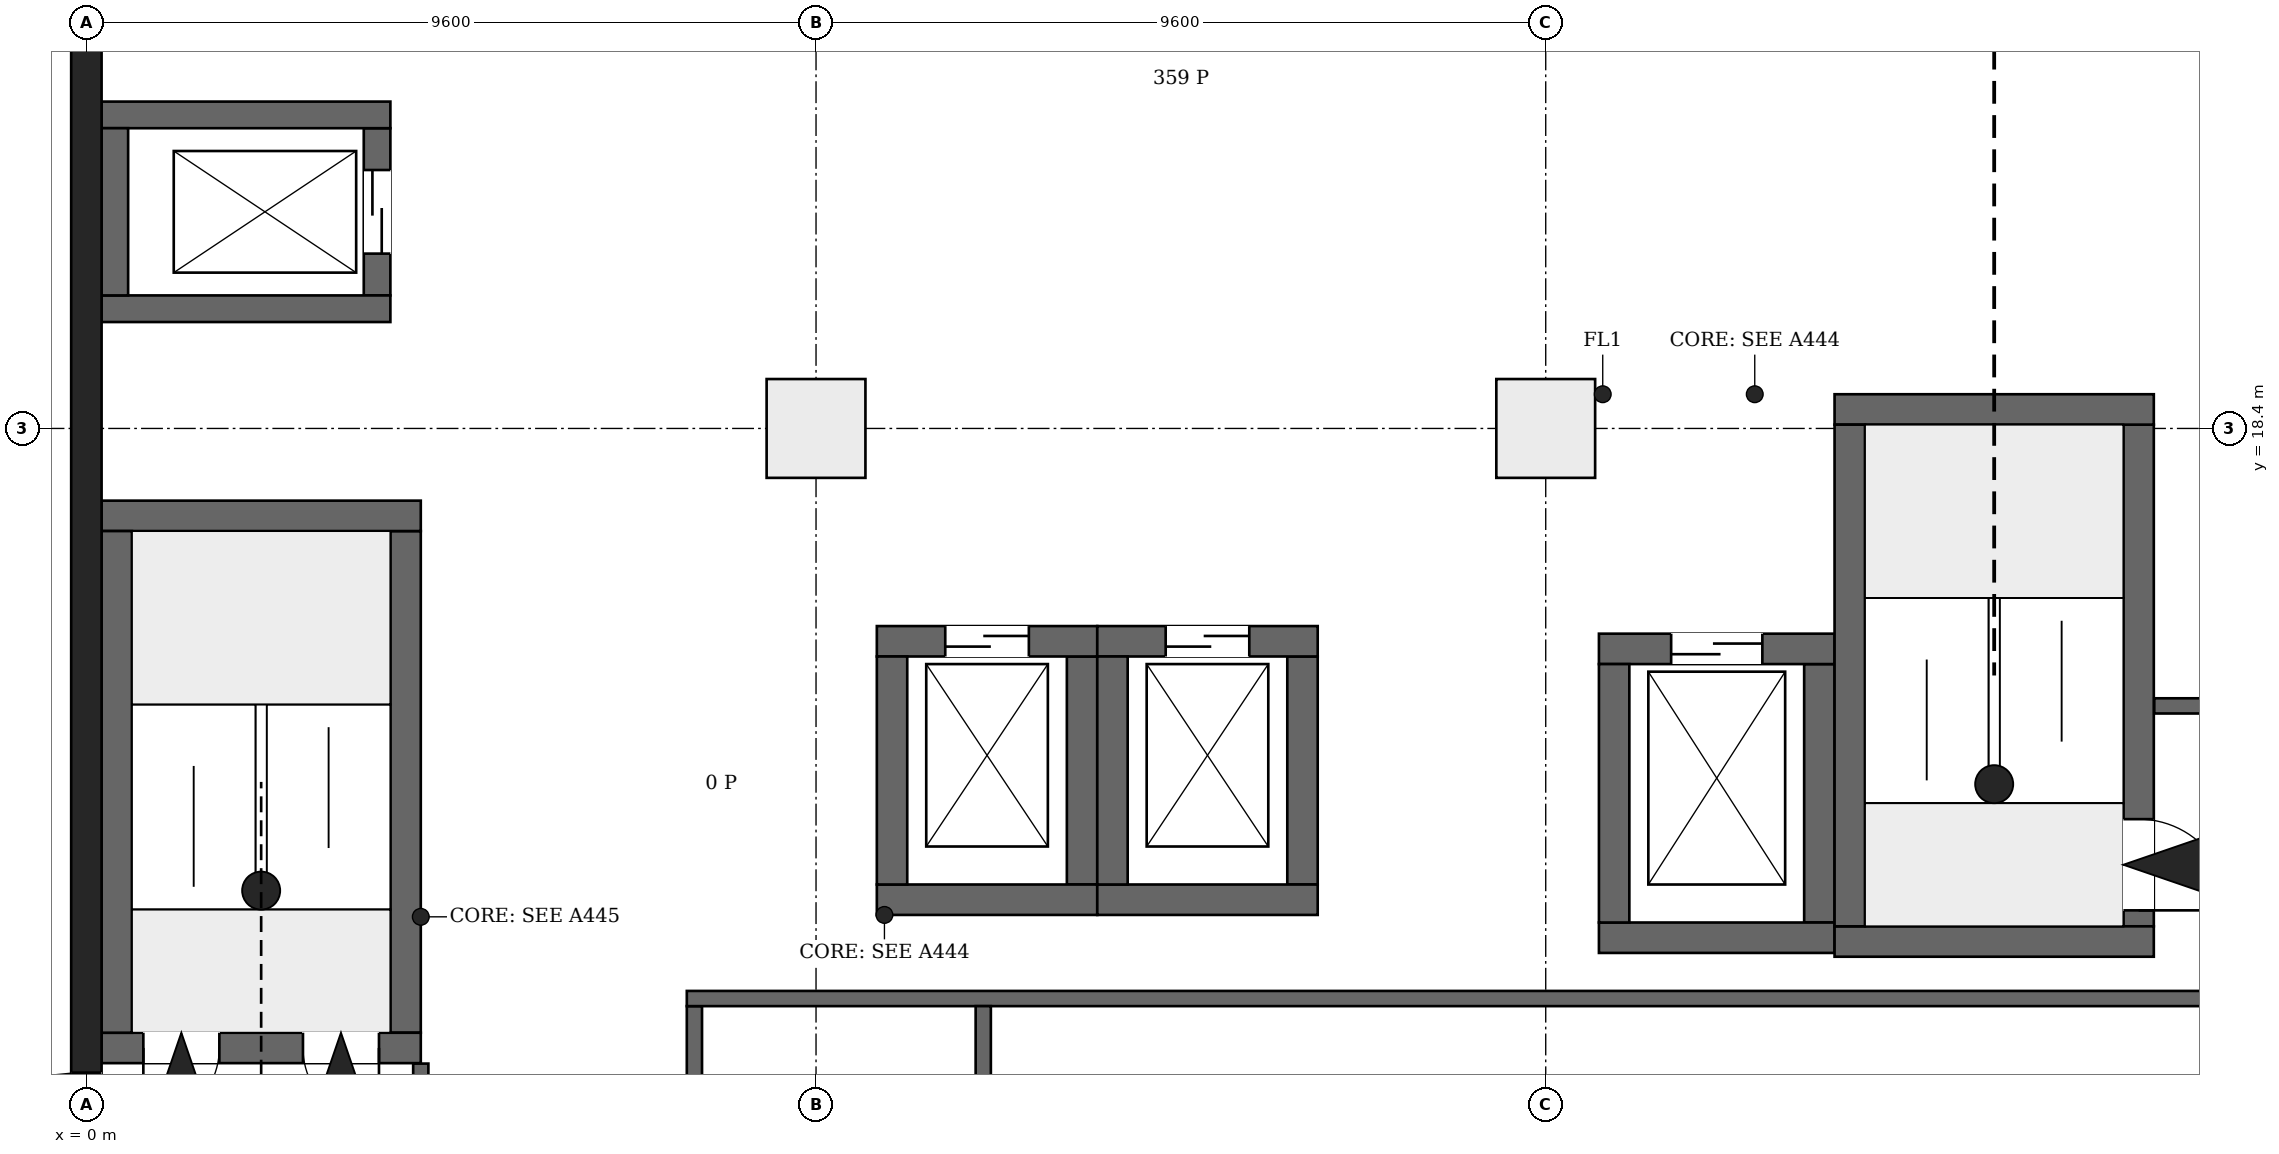
"""IFC4 building model, lengths in metres.
Left out: names, types, materials, properties, quantities, classifications, styles, units other than length and angle.
Written with IfcOpenShell. Run it as: python <this file> out.ifc"""

import sys

from ifc_helpers import new_model, si_unit, direction, frame, frame_2d, origin, origin_2d, place, context, subcontext, project, spatial, rectangle, extrude, element, fill, save


model = new_model("IFC4")
c1 = context("Model", 3, precision=1e-05, world=origin(), true_north=direction((0.0, 1.0)))
c2 = subcontext(c1, "Body", "Model", "MODEL_VIEW")
j1 = project(units=[si_unit("LENGTHUNIT", "METRE"), si_unit("PLANEANGLEUNIT", "RADIAN")], contexts=[c1])
p1 = place(None, origin())
s1 = spatial("IfcSite", under=j1, at=p1, CompositionType="ELEMENT")
p2 = place(p1, origin())
s2 = spatial("IfcBuilding", under=s1, at=p2, CompositionType="ELEMENT")
p3 = place(p2, origin())
s3 = spatial("IfcBuildingStorey", under=s2, at=p3, CompositionType="ELEMENT", Elevation=0.0)
p4 = place(p3, frame((0.0, -0.2, 0.0), z_axis=(0.0, 0.0, 1.0), x_axis=(0.0, 1.0, 0.0)))
e1 = element("IfcWall", 1, at=p4, inside=s3, PredefinedType="SHEAR", context=c2, shape_type="SweptSolid", body=[
    extrude(rectangle(XDim=46.88, YDim=0.4, at=frame_2d((23.44, 0.0))), origin(), (0.0, 0.0, 1.0), 6.5),
])
p5 = place(p4, frame((7.125, 0.0, 0.0)))
e2 = element("IfcOpeningElement", 2, at=p5, cuts=e1, PredefinedType="OPENING", context=c2, shape_type="SweptSolid", body=[
    extrude(rectangle(XDim=3.0, YDim=2.4, at=frame_2d((1.5, 1.2))), frame((0.0, 0.21, 0.0), z_axis=(0.0, -1.0, 0.0), x_axis=(1.0, 0.0, 0.0)), (0.0, 0.0, 1.0), 0.42),
])
p6 = place(p4, frame((38.2, 0.0, 0.0)))
e3 = element("IfcOpeningElement", 3, at=p6, cuts=e1, PredefinedType="OPENING", context=c2, shape_type="SweptSolid", body=[
    extrude(rectangle(XDim=3.0, YDim=2.4, at=frame_2d((1.5, 1.2))), frame((0.0, 0.21, 0.0), z_axis=(0.0, -1.0, 0.0), x_axis=(1.0, 0.0, 0.0)), (0.0, 0.0, 1.0), 0.42),
])
p7 = place(p3, frame((0.2, 10.25, 0.0), z_axis=(0.0, 0.0, 1.0), x_axis=(1.0, 0.0, 0.0)))
e4 = element("IfcWall", 4, at=p7, inside=s3, PredefinedType="SHEAR", context=c2, shape_type="SweptSolid", body=[
    extrude(rectangle(XDim=4.2, YDim=0.4, at=frame_2d((2.1, 0.0))), origin(), (0.0, 0.0, 1.0), 6.5),
])
p8 = place(p7, frame((0.55, 0.0, 0.0)))
e5 = element("IfcOpeningElement", 5, at=p8, cuts=e4, PredefinedType="OPENING", context=c2, shape_type="SweptSolid", body=[
    extrude(rectangle(XDim=1.0, YDim=2.1, at=frame_2d((0.5, 1.05))), frame((0.0, 0.21, 0.0), z_axis=(0.0, -1.0, 0.0), x_axis=(1.0, 0.0, 0.0)), (0.0, 0.0, 1.0), 0.42),
])
p9 = place(p7, frame((2.65, 0.0, 0.0)))
e6 = element("IfcOpeningElement", 6, at=p9, cuts=e4, PredefinedType="OPENING", context=c2, shape_type="SweptSolid", body=[
    extrude(rectangle(XDim=1.0, YDim=2.1, at=frame_2d((0.5, 1.05))), frame((0.0, 0.21, 0.0), z_axis=(0.0, -1.0, 0.0), x_axis=(1.0, 0.0, 0.0)), (0.0, 0.0, 1.0), 0.42),
])
p10 = place(p3, frame((0.2, 17.25, 0.0), z_axis=(0.0, 0.0, 1.0), x_axis=(1.0, 0.0, 0.0)))
e7 = element("IfcWall", 7, at=p10, inside=s3, PredefinedType="SHEAR", context=c2, shape_type="SweptSolid", body=[
    extrude(rectangle(XDim=4.2, YDim=0.4, at=frame_2d((2.1, 0.0))), origin(), (0.0, 0.0, 1.0), 6.5),
])
for number, where, z_axis, x_axis in (
    (8, (0.4, 10.45, 0.0), (0.0, 0.0, 1.0), (0.0, 1.0, 0.0)),
    (9, (4.2, 10.45, 0.0), (0.0, 0.0, 1.0), (0.0, 1.0, 0.0)),
):
    element("IfcWall", number, at=place(p3, frame(where, z_axis=z_axis, x_axis=x_axis)), inside=s3, PredefinedType="SHEAR", context=c2, shape_type="SweptSolid", body=[
        extrude(rectangle(XDim=6.6, YDim=0.4, at=frame_2d((3.3, 0.0))), origin(), (0.0, 0.0, 1.0), 6.5),
    ])
for number, where, z_axis, x_axis in (
    (10, (23.0, 11.65, 0.0), (0.0, 0.0, 1.0), (1.0, 0.0, 0.0)),
    (11, (23.0, 18.65, 0.0), (0.0, 0.0, 1.0), (1.0, 0.0, 0.0)),
):
    element("IfcWall", number, at=place(p3, frame(where, z_axis=z_axis, x_axis=x_axis)), inside=s3, PredefinedType="SHEAR", context=c2, shape_type="SweptSolid", body=[
        extrude(rectangle(XDim=4.2, YDim=0.4, at=frame_2d((2.1, 0.0))), origin(), (0.0, 0.0, 1.0), 6.5),
    ])
p11 = place(p3, frame((23.2, 11.85, 0.0), z_axis=(0.0, 0.0, 1.0), x_axis=(0.0, 1.0, 0.0)))
e12 = element("IfcWall", 12, at=p11, inside=s3, PredefinedType="SHEAR", context=c2, shape_type="SweptSolid", body=[
    extrude(rectangle(XDim=6.6, YDim=0.4, at=frame_2d((3.3, 0.0))), origin(), (0.0, 0.0, 1.0), 6.5),
])
p12 = place(p3, frame((27.0, 11.85, 0.0), z_axis=(0.0, 0.0, 1.0), x_axis=(0.0, 1.0, 0.0)))
e13 = element("IfcWall", 13, at=p12, inside=s3, PredefinedType="SHEAR", context=c2, shape_type="SweptSolid", body=[
    extrude(rectangle(XDim=6.6, YDim=0.4, at=frame_2d((3.3, 0.0))), origin(), (0.0, 0.0, 1.0), 6.5),
])
p13 = place(p12, frame((0.21, 0.0, 0.0)))
e14 = element("IfcOpeningElement", 14, at=p13, cuts=e13, PredefinedType="OPENING", context=c2, shape_type="SweptSolid", body=[
    extrude(rectangle(XDim=1.2, YDim=2.1, at=frame_2d((0.6, 1.05))), frame((0.0, 0.21, 0.0), z_axis=(0.0, -1.0, 0.0), x_axis=(1.0, 0.0, 0.0)), (0.0, 0.0, 1.0), 0.42),
])
for number, where, z_axis, x_axis in (
    (15, (0.2, 19.975, 0.0), (0.0, 0.0, 1.0), (1.0, 0.0, 0.0)),
    (16, (0.2, 22.525, 0.0), (0.0, 0.0, 1.0), (1.0, 0.0, 0.0)),
):
    element("IfcWall", number, at=place(p3, frame(where, z_axis=z_axis, x_axis=x_axis)), inside=s3, PredefinedType="SHEAR", context=c2, shape_type="SweptSolid", body=[
        extrude(rectangle(XDim=3.8, YDim=0.35, at=frame_2d((1.9, 0.0))), origin(), (0.0, 0.0, 1.0), 6.5),
    ])
p14 = place(p3, frame((0.375, 20.15, 0.0), z_axis=(0.0, 0.0, 1.0), x_axis=(0.0, 1.0, 0.0)))
e17 = element("IfcWall", 17, at=p14, inside=s3, PredefinedType="SHEAR", context=c2, shape_type="SweptSolid", body=[
    extrude(rectangle(XDim=2.2, YDim=0.35, at=frame_2d((1.1, 0.0))), origin(), (0.0, 0.0, 1.0), 6.5),
])
p15 = place(p3, frame((3.825, 20.15, 0.0), z_axis=(0.0, 0.0, 1.0), x_axis=(0.0, 1.0, 0.0)))
e18 = element("IfcWall", 18, at=p15, inside=s3, PredefinedType="SHEAR", context=c2, shape_type="SweptSolid", body=[
    extrude(rectangle(XDim=2.2, YDim=0.35, at=frame_2d((1.1, 0.0))), origin(), (0.0, 0.0, 1.0), 6.5),
])
p16 = place(p15, frame((0.55, 0.0, 0.0)))
e19 = element("IfcOpeningElement", 19, at=p16, cuts=e18, PredefinedType="OPENING", context=c2, shape_type="SweptSolid", body=[
    extrude(rectangle(XDim=1.1, YDim=2.1, at=frame_2d((0.55, 1.05))), frame((0.0, 0.185, 0.0), z_axis=(0.0, -1.0, 0.0), x_axis=(1.0, 0.0, 0.0)), (0.0, 0.0, 1.0), 0.37),
])
p17 = place(p3, frame((10.4, 12.2, 0.0), z_axis=(0.0, 0.0, 1.0), x_axis=(1.0, 0.0, 0.0)))
e20 = element("IfcWall", 20, at=p17, inside=s3, PredefinedType="SHEAR", context=c2, shape_type="SweptSolid", body=[
    extrude(rectangle(XDim=2.9, YDim=0.4, at=frame_2d((1.45, 0.0))), origin(), (0.0, 0.0, 1.0), 6.5),
])
p18 = place(p3, frame((10.4, 15.6, 0.0), z_axis=(0.0, 0.0, 1.0), x_axis=(1.0, 0.0, 0.0)))
e21 = element("IfcWall", 21, at=p18, inside=s3, PredefinedType="SHEAR", context=c2, shape_type="SweptSolid", body=[
    extrude(rectangle(XDim=2.9, YDim=0.4, at=frame_2d((1.45, 0.0))), origin(), (0.0, 0.0, 1.0), 6.5),
])
p19 = place(p18, frame((0.9, 0.0, 0.0)))
e22 = element("IfcOpeningElement", 22, at=p19, cuts=e21, PredefinedType="OPENING", context=c2, shape_type="SweptSolid", body=[
    extrude(rectangle(XDim=1.1, YDim=2.1, at=frame_2d((0.55, 1.05))), frame((0.0, 0.21, 0.0), z_axis=(0.0, -1.0, 0.0), x_axis=(1.0, 0.0, 0.0)), (0.0, 0.0, 1.0), 0.42),
])
for number, where, z_axis, x_axis in (
    (23, (10.6, 12.4, 0.0), (0.0, 0.0, 1.0), (0.0, 1.0, 0.0)),
    (24, (13.1, 12.4, 0.0), (0.0, 0.0, 1.0), (0.0, 1.0, 0.0)),
):
    element("IfcWall", number, at=place(p3, frame(where, z_axis=z_axis, x_axis=x_axis)), inside=s3, PredefinedType="SHEAR", context=c2, shape_type="SweptSolid", body=[
        extrude(rectangle(XDim=3.0, YDim=0.4, at=frame_2d((1.5, 0.0))), origin(), (0.0, 0.0, 1.0), 6.5),
    ])
p20 = place(p3, frame((13.3, 12.2, 0.0), z_axis=(0.0, 0.0, 1.0), x_axis=(1.0, 0.0, 0.0)))
e25 = element("IfcWall", 25, at=p20, inside=s3, PredefinedType="SHEAR", context=c2, shape_type="SweptSolid", body=[
    extrude(rectangle(XDim=2.9, YDim=0.4, at=frame_2d((1.45, 0.0))), origin(), (0.0, 0.0, 1.0), 6.5),
])
p21 = place(p3, frame((13.3, 15.6, 0.0), z_axis=(0.0, 0.0, 1.0), x_axis=(1.0, 0.0, 0.0)))
e26 = element("IfcWall", 26, at=p21, inside=s3, PredefinedType="SHEAR", context=c2, shape_type="SweptSolid", body=[
    extrude(rectangle(XDim=2.9, YDim=0.4, at=frame_2d((1.45, 0.0))), origin(), (0.0, 0.0, 1.0), 6.5),
])
p22 = place(p21, frame((0.9, 0.0, 0.0)))
e27 = element("IfcOpeningElement", 27, at=p22, cuts=e26, PredefinedType="OPENING", context=c2, shape_type="SweptSolid", body=[
    extrude(rectangle(XDim=1.1, YDim=2.1, at=frame_2d((0.55, 1.05))), frame((0.0, 0.21, 0.0), z_axis=(0.0, -1.0, 0.0), x_axis=(1.0, 0.0, 0.0)), (0.0, 0.0, 1.0), 0.42),
])
for number, where, z_axis, x_axis in (
    (28, (13.5, 12.4, 0.0), (0.0, 0.0, 1.0), (0.0, 1.0, 0.0)),
    (29, (16.0, 12.4, 0.0), (0.0, 0.0, 1.0), (0.0, 1.0, 0.0)),
):
    element("IfcWall", number, at=place(p3, frame(where, z_axis=z_axis, x_axis=x_axis)), inside=s3, PredefinedType="SHEAR", context=c2, shape_type="SweptSolid", body=[
        extrude(rectangle(XDim=3.0, YDim=0.4, at=frame_2d((1.5, 0.0))), origin(), (0.0, 0.0, 1.0), 6.5),
    ])
p23 = place(p3, frame((19.9, 11.7, 0.0), z_axis=(0.0, 0.0, 1.0), x_axis=(1.0, 0.0, 0.0)))
e30 = element("IfcWall", 30, at=p23, inside=s3, PredefinedType="SHEAR", context=c2, shape_type="SweptSolid", body=[
    extrude(rectangle(XDim=3.1, YDim=0.4, at=frame_2d((1.55, 0.0))), origin(), (0.0, 0.0, 1.0), 6.5),
])
p24 = place(p3, frame((19.9, 15.5, 0.0), z_axis=(0.0, 0.0, 1.0), x_axis=(1.0, 0.0, 0.0)))
e31 = element("IfcWall", 31, at=p24, inside=s3, PredefinedType="SHEAR", context=c2, shape_type="SweptSolid", body=[
    extrude(rectangle(XDim=3.1, YDim=0.4, at=frame_2d((1.55, 0.0))), origin(), (0.0, 0.0, 1.0), 6.5),
])
p25 = place(p24, frame((0.95, 0.0, 0.0)))
e32 = element("IfcOpeningElement", 32, at=p25, cuts=e31, PredefinedType="OPENING", context=c2, shape_type="SweptSolid", body=[
    extrude(rectangle(XDim=1.2, YDim=2.1, at=frame_2d((0.6, 1.05))), frame((0.0, 0.21, 0.0), z_axis=(0.0, -1.0, 0.0), x_axis=(1.0, 0.0, 0.0)), (0.0, 0.0, 1.0), 0.42),
])
for number, where, z_axis, x_axis in (
    (33, (20.1, 11.9, 0.0), (0.0, 0.0, 1.0), (0.0, 1.0, 0.0)),
    (34, (22.8, 11.9, 0.0), (0.0, 0.0, 1.0), (0.0, 1.0, 0.0)),
):
    element("IfcWall", number, at=place(p3, frame(where, z_axis=z_axis, x_axis=x_axis)), inside=s3, PredefinedType="SHEAR", context=c2, shape_type="SweptSolid", body=[
        extrude(rectangle(XDim=3.4, YDim=0.4, at=frame_2d((1.7, 0.0))), origin(), (0.0, 0.0, 1.0), 6.5),
    ])
for number, where, z_axis, x_axis in (
    (35, (9.6, 18.4, 0.0), (0.0, 0.0, 1.0), (1.0, 0.0, 0.0)),
    (36, (19.2, 18.4, 0.0), (0.0, 0.0, 1.0), (1.0, 0.0, 0.0)),
):
    element("IfcColumn", number, at=place(p3, frame(where, z_axis=z_axis, x_axis=x_axis)), inside=s3, PredefinedType="COLUMN", context=c2, shape_type="SweptSolid", body=[
        extrude(rectangle(XDim=1.3, YDim=1.3, at=origin_2d()), origin(), (0.0, 0.0, 1.0), 6.5),
    ])
p26 = place(p3, frame((4.4, 6.6, 0.0), z_axis=(0.0, 0.0, 1.0), x_axis=(0.0, 1.0, 0.0)))
e37 = element("IfcWall", 37, at=p26, inside=s3, PredefinedType="PARTITIONING", context=c2, shape_type="SweptSolid", body=[
    extrude(rectangle(XDim=3.444, YDim=0.2, at=frame_2d((1.722, 0.0))), origin(), (0.0, 0.0, 1.0), 6.15),
])
p27 = place(p26, frame((1.222, 0.0, 0.0)))
e38 = element("IfcOpeningElement", 38, at=p27, cuts=e37, PredefinedType="OPENING", context=c2, shape_type="SweptSolid", body=[
    extrude(rectangle(XDim=1.0, YDim=2.1, at=frame_2d((0.5, 1.05))), frame((0.0, 0.11, 0.0), z_axis=(0.0, -1.0, 0.0), x_axis=(1.0, 0.0, 0.0)), (0.0, 0.0, 1.0), 0.22),
])
p28 = place(p3, frame((8.0, 0.206, 0.0), z_axis=(0.0, 0.0, 1.0), x_axis=(0.0, 1.0, 0.0)))
e39 = element("IfcWall", 39, at=p28, inside=s3, PredefinedType="PARTITIONING", context=c2, shape_type="SweptSolid", body=[
    extrude(rectangle(XDim=10.594, YDim=0.2, at=frame_2d((5.297, 0.0))), origin(), (0.0, 0.0, 1.0), 6.15),
])
p29 = place(p28, frame((4.697, 0.0, 0.0)))
e40 = element("IfcOpeningElement", 40, at=p29, cuts=e39, PredefinedType="OPENING", context=c2, shape_type="SweptSolid", body=[
    extrude(rectangle(XDim=1.2, YDim=2.1, at=frame_2d((0.6, 1.05))), frame((0.0, 0.11, 0.0), z_axis=(0.0, -1.0, 0.0), x_axis=(1.0, 0.0, 0.0)), (0.0, 0.0, 1.0), 0.22),
])
p30 = place(p3, frame((7.9, 10.9, 0.0), z_axis=(0.0, 0.0, 1.0), x_axis=(1.0, 0.0, 0.0)))
e41 = element("IfcWall", 41, at=p30, inside=s3, PredefinedType="PARTITIONING", context=c2, shape_type="SweptSolid", body=[
    extrude(rectangle(XDim=49.494, YDim=0.2, at=frame_2d((24.747, 0.0))), origin(), (0.0, 0.0, 1.0), 6.15),
])
p31 = place(p30, frame((41.3, 0.0, 0.0)))
e42 = element("IfcOpeningElement", 42, at=p31, cuts=e41, PredefinedType="OPENING", context=c2, shape_type="SweptSolid", body=[
    extrude(rectangle(XDim=1.2, YDim=2.1, at=frame_2d((0.6, 1.05))), frame((0.0, 0.11, 0.0), z_axis=(0.0, -1.0, 0.0), x_axis=(1.0, 0.0, 0.0)), (0.0, 0.0, 1.0), 0.22),
])
p32 = place(p3, frame((11.8, 0.206, 0.0), z_axis=(0.0, 0.0, 1.0), x_axis=(0.0, 1.0, 0.0)))
e43 = element("IfcWall", 43, at=p32, inside=s3, PredefinedType="PARTITIONING", context=c2, shape_type="SweptSolid", body=[
    extrude(rectangle(XDim=10.594, YDim=0.2, at=frame_2d((5.297, 0.0))), origin(), (0.0, 0.0, 1.0), 6.15),
])
p33 = place(p32, frame((4.397, 0.0, 0.0)))
e44 = element("IfcOpeningElement", 44, at=p33, cuts=e43, PredefinedType="OPENING", context=c2, shape_type="SweptSolid", body=[
    extrude(rectangle(XDim=1.8, YDim=2.1, at=frame_2d((0.9, 1.05))), frame((0.0, 0.11, 0.0), z_axis=(0.0, -1.0, 0.0), x_axis=(1.0, 0.0, 0.0)), (0.0, 0.0, 1.0), 0.22),
])
p34 = place(p3, frame((27.206, 14.75, 0.0), z_axis=(0.0, 0.0, 1.0), x_axis=(1.0, 0.0, 0.0)))
e45 = element("IfcWall", 45, at=p34, inside=s3, PredefinedType="PARTITIONING", context=c2, shape_type="SweptSolid", body=[
    extrude(rectangle(XDim=30.188, YDim=0.2, at=frame_2d((15.094, 0.0))), origin(), (0.0, 0.0, 1.0), 6.15),
])
p35 = place(p5, origin())
e46 = element("IfcDoor", 46, at=p35, inside=s3, OperationType="DOUBLE_DOOR_SINGLE_SWING", PredefinedType="DOOR", context=c2, shape_type="SweptSolid", body=[
    extrude(rectangle(XDim=3.0, YDim=2.4, at=frame_2d((1.5, 1.2))), frame((0.0, 0.025, 0.0), z_axis=(0.0, -1.0, 0.0), x_axis=(1.0, 0.0, 0.0)), (0.0, 0.0, 1.0), 0.05),
])
fill(e2, e46)
p36 = place(p8, origin())
e47 = element("IfcDoor", 47, at=p36, inside=s3, OperationType="SINGLE_SWING_LEFT", PredefinedType="DOOR", context=c2, shape_type="SweptSolid", body=[
    extrude(rectangle(XDim=1.0, YDim=2.1, at=frame_2d((0.5, 1.05))), frame((0.0, 0.025, 0.0), z_axis=(0.0, -1.0, 0.0), x_axis=(1.0, 0.0, 0.0)), (0.0, 0.0, 1.0), 0.05),
])
fill(e5, e47)
p37 = place(p9, origin())
e48 = element("IfcDoor", 48, at=p37, inside=s3, OperationType="SINGLE_SWING_RIGHT", PredefinedType="DOOR", context=c2, shape_type="SweptSolid", body=[
    extrude(rectangle(XDim=1.0, YDim=2.1, at=frame_2d((0.5, 1.05))), frame((0.0, 0.025, 0.0), z_axis=(0.0, -1.0, 0.0), x_axis=(1.0, 0.0, 0.0)), (0.0, 0.0, 1.0), 0.05),
])
fill(e6, e48)
p38 = place(p13, origin())
e49 = element("IfcDoor", 49, at=p38, inside=s3, OperationType="SINGLE_SWING_LEFT", PredefinedType="DOOR", context=c2, shape_type="SweptSolid", body=[
    extrude(rectangle(XDim=1.2, YDim=2.1, at=frame_2d((0.6, 1.05))), frame((0.0, 0.025, 0.0), z_axis=(0.0, -1.0, 0.0), x_axis=(1.0, 0.0, 0.0)), (0.0, 0.0, 1.0), 0.05),
])
fill(e14, e49)
p39 = place(p16, origin())
e50 = element("IfcDoor", 50, at=p39, inside=s3, OperationType="DOUBLE_DOOR_SLIDING", PredefinedType="DOOR", context=c2, shape_type="SweptSolid", body=[
    extrude(rectangle(XDim=1.1, YDim=2.1, at=frame_2d((0.55, 1.05))), frame((0.0, 0.025, 0.0), z_axis=(0.0, -1.0, 0.0), x_axis=(1.0, 0.0, 0.0)), (0.0, 0.0, 1.0), 0.05),
])
fill(e19, e50)
p40 = place(p19, origin())
e51 = element("IfcDoor", 51, at=p40, inside=s3, OperationType="DOUBLE_DOOR_SLIDING", PredefinedType="DOOR", context=c2, shape_type="SweptSolid", body=[
    extrude(rectangle(XDim=1.1, YDim=2.1, at=frame_2d((0.55, 1.05))), frame((0.0, 0.025, 0.0), z_axis=(0.0, -1.0, 0.0), x_axis=(1.0, 0.0, 0.0)), (0.0, 0.0, 1.0), 0.05),
])
fill(e22, e51)
p41 = place(p22, origin())
e52 = element("IfcDoor", 52, at=p41, inside=s3, OperationType="DOUBLE_DOOR_SLIDING", PredefinedType="DOOR", context=c2, shape_type="SweptSolid", body=[
    extrude(rectangle(XDim=1.1, YDim=2.1, at=frame_2d((0.55, 1.05))), frame((0.0, 0.025, 0.0), z_axis=(0.0, -1.0, 0.0), x_axis=(1.0, 0.0, 0.0)), (0.0, 0.0, 1.0), 0.05),
])
fill(e27, e52)
p42 = place(p25, origin())
e53 = element("IfcDoor", 53, at=p42, inside=s3, OperationType="DOUBLE_DOOR_SLIDING", PredefinedType="DOOR", context=c2, shape_type="SweptSolid", body=[
    extrude(rectangle(XDim=1.2, YDim=2.1, at=frame_2d((0.6, 1.05))), frame((0.0, 0.025, 0.0), z_axis=(0.0, -1.0, 0.0), x_axis=(1.0, 0.0, 0.0)), (0.0, 0.0, 1.0), 0.05),
])
fill(e32, e53)
save(model, sys.argv[1])
